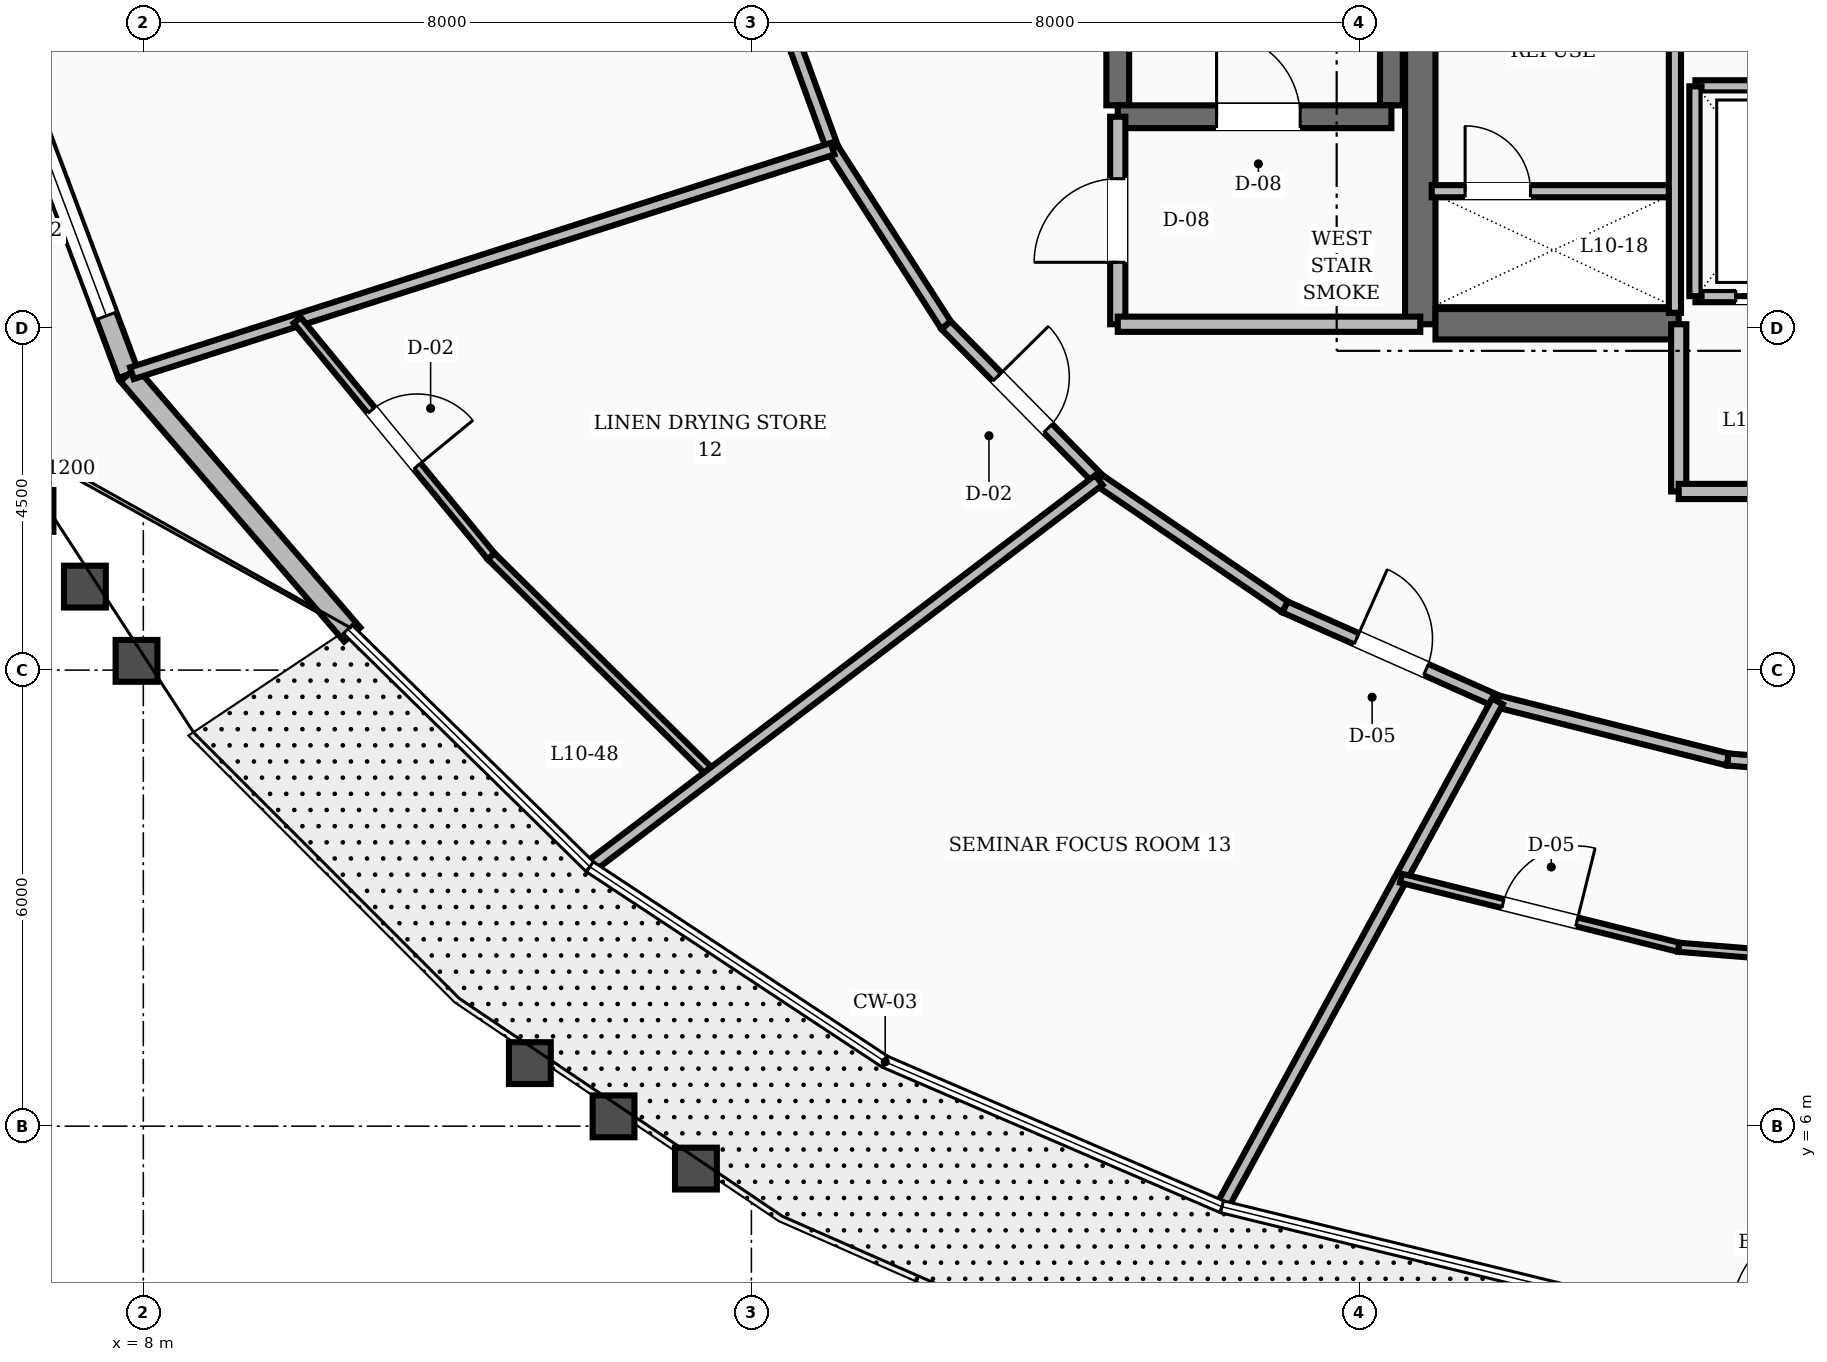
"""IFC4 building model, lengths in metres.
Left out: names, types, materials, properties, quantities, classifications, styles, units other than length and angle.
Written with IfcOpenShell. Run it as: python <this file> out.ifc"""

import sys

from ifc_helpers import new_model, si_unit, direction, frame, frame_2d, origin, place, context, subcontext, project, spatial, rectangle, extrude, element, fill, save


model = new_model("IFC4")
c1 = context("Model", 3, precision=1e-05, world=origin(), true_north=direction((0.0, 1.0)))
c2 = subcontext(c1, "Body", "Model", "MODEL_VIEW")
j1 = project(units=[si_unit("LENGTHUNIT", "METRE"), si_unit("PLANEANGLEUNIT", "RADIAN")], contexts=[c1])
p1 = place(None, origin())
s1 = spatial("IfcSite", under=j1, at=p1, CompositionType="ELEMENT")
p2 = place(p1, origin())
s2 = spatial("IfcBuilding", under=s1, at=p2, CompositionType="ELEMENT")
p3 = place(p2, frame((0.0, 0.0, 44.8)))
s3 = spatial("IfcBuildingStorey", under=s2, at=p3, CompositionType="ELEMENT", Elevation=44.8)
p4 = place(p3, frame((24.8, 16.55, 0.0), z_axis=(0.0, 0.0, 1.0), x_axis=(0.0, 1.0, 0.0)))
e1 = element("IfcWall", 1, at=p4, inside=s3, PredefinedType="SHEAR", context=c2, shape_type="SweptSolid", body=[
    extrude(rectangle(XDim=6.3, YDim=0.4, at=frame_2d((3.15, 0.0))), origin(), (0.0, 0.0, 1.0), 3.6),
])
p5 = place(p3, frame((25.0, 16.55, 0.0), z_axis=(0.0, 0.0, 1.0), x_axis=(1.0, 0.0, 0.0)))
e2 = element("IfcWall", 2, at=p5, inside=s3, PredefinedType="SHEAR", context=c2, shape_type="SweptSolid", body=[
    extrude(rectangle(XDim=3.2, YDim=0.4, at=frame_2d((1.6, 0.0))), origin(), (0.0, 0.0, 1.0), 3.6),
])
for number, where, z_axis, x_axis in (
    (3, (20.82, 19.43, 0.0), (0.0, 0.0, 1.0), (0.0, 1.0, 0.0)),
    (4, (24.42, 19.43, 0.0), (0.0, 0.0, 1.0), (0.0, 1.0, 0.0)),
):
    element("IfcWall", number, at=place(p3, frame(where, z_axis=z_axis, x_axis=x_axis)), inside=s3, PredefinedType="SHEAR", context=c2, shape_type="SweptSolid", body=[
        extrude(rectangle(XDim=8.74, YDim=0.3, at=frame_2d((4.37, 0.0))), origin(), (0.0, 0.0, 1.0), 3.6),
    ])
p6 = place(p3, frame((20.82, 19.28, 0.0), z_axis=(0.0, 0.0, 1.0), x_axis=(1.0, 0.0, 0.0)))
e5 = element("IfcWall", 5, at=p6, inside=s3, PredefinedType="SHEAR", context=c2, shape_type="SweptSolid", body=[
    extrude(rectangle(XDim=3.6, YDim=0.3, at=frame_2d((1.8, 0.0))), origin(), (0.0, 0.0, 1.0), 3.6),
])
p7 = place(p6, frame((1.3, 0.0, 0.0)))
e6 = element("IfcOpeningElement", 6, at=p7, cuts=e5, PredefinedType="OPENING", context=c2, shape_type="SweptSolid", body=[
    extrude(rectangle(XDim=1.1, YDim=2.1, at=frame_2d((0.55, 1.05))), frame((0.0, 0.16, 0.0), z_axis=(0.0, -1.0, 0.0), x_axis=(1.0, 0.0, 0.0)), (0.0, 0.0, 1.0), 0.32),
])
p8 = place(p3, frame((6.312, 19.866, 0.0), z_axis=(0.0, 0.0, 1.0), x_axis=(0.351066723894, -0.936350444745, 0.0)))
e7 = element("IfcWall", 7, at=p8, inside=s3, PredefinedType="STANDARD", context=c2, shape_type="SweptSolid", body=[
    extrude(rectangle(XDim=4.246, YDim=0.28, at=frame_2d((2.123, 0.0))), origin(), (0.0, 0.0, 1.0), 2.65),
])
p9 = place(p8, frame((0.823, 0.0, 0.8)))
e8 = element("IfcOpeningElement", 8, at=p9, cuts=e7, PredefinedType="OPENING", context=c2, shape_type="SweptSolid", body=[
    extrude(rectangle(XDim=2.6, YDim=1.65, at=frame_2d((1.3, 0.825))), frame((0.0, 0.15, 0.0), z_axis=(0.0, -1.0, 0.0), x_axis=(1.0, 0.0, 0.0)), (0.0, 0.0, 1.0), 0.3),
])
p10 = place(p3, frame((7.803, 15.891, 0.0), z_axis=(0.0, 0.0, 1.0), x_axis=(0.652392900896, -0.757880929211, 0.0)))
e9 = element("IfcWall", 9, at=p10, inside=s3, PredefinedType="STANDARD", context=c2, shape_type="SweptSolid", body=[
    extrude(rectangle(XDim=4.515, YDim=0.28, at=frame_2d((2.258, 0.0))), origin(), (0.0, 0.0, 1.0), 2.65),
])
p11 = place(p3, frame((20.82, 16.55, 0.0), z_axis=(0.0, 0.0, 1.0), x_axis=(0.0, 1.0, 0.0)))
e10 = element("IfcWall", 10, at=p11, inside=s3, PredefinedType="SOLIDWALL", context=c2, shape_type="SweptSolid", body=[
    extrude(rectangle(XDim=2.73, YDim=0.2, at=frame_2d((1.365, 0.0))), origin(), (0.0, 0.0, 1.0), 2.61),
])
p12 = place(p11, frame((0.815, 0.0, 0.0)))
e11 = element("IfcOpeningElement", 11, at=p12, cuts=e10, PredefinedType="OPENING", context=c2, shape_type="SweptSolid", body=[
    extrude(rectangle(XDim=1.1, YDim=2.1, at=frame_2d((0.55, 1.05))), frame((0.0, 0.11, 0.0), z_axis=(0.0, -1.0, 0.0), x_axis=(1.0, 0.0, 0.0)), (0.0, 0.0, 1.0), 0.22),
])
p13 = place(p3, frame((20.82, 16.55, 0.0), z_axis=(0.0, 0.0, 1.0), x_axis=(1.0, 0.0, 0.0)))
e12 = element("IfcWall", 12, at=p13, inside=s3, PredefinedType="SOLIDWALL", context=c2, shape_type="SweptSolid", body=[
    extrude(rectangle(XDim=3.98, YDim=0.2, at=frame_2d((1.99, 0.0))), origin(), (0.0, 0.0, 1.0), 2.61),
])
p14 = place(p3, frame((28.2, 14.35, 0.0), z_axis=(0.0, 0.0, 1.0), x_axis=(0.0, 1.0, 0.0)))
e13 = element("IfcWall", 13, at=p14, inside=s3, PredefinedType="SOLIDWALL", context=c2, shape_type="SweptSolid", body=[
    extrude(rectangle(XDim=2.2, YDim=0.2, at=frame_2d((1.1, 0.0))), origin(), (0.0, 0.0, 1.0), 2.61),
])
p15 = place(p3, frame((28.2, 14.35, 0.0), z_axis=(0.0, 0.0, 1.0), x_axis=(1.0, 0.0, 0.0)))
e14 = element("IfcWall", 14, at=p15, inside=s3, PredefinedType="SOLIDWALL", context=c2, shape_type="SweptSolid", body=[
    extrude(rectangle(XDim=7.6, YDim=0.2, at=frame_2d((3.8, 0.0))), origin(), (0.0, 0.0, 1.0), 2.61),
])
p16 = place(p15, frame((3.2, 0.0, 0.0)))
e15 = element("IfcOpeningElement", 15, at=p16, cuts=e14, PredefinedType="OPENING", context=c2, shape_type="SweptSolid", body=[
    extrude(rectangle(XDim=1.2, YDim=2.1, at=frame_2d((0.6, 1.05))), frame((0.0, 0.11, 0.0), z_axis=(0.0, -1.0, 0.0), x_axis=(1.0, 0.0, 0.0)), (0.0, 0.0, 1.0), 0.22),
])
p17 = place(p3, frame((28.42, 16.92, 0.0), z_axis=(0.0, 0.0, 1.0), x_axis=(1.0, 0.0, 0.0)))
e16 = element("IfcWall", 16, at=p17, inside=s3, PredefinedType="SOLIDWALL", context=c2, shape_type="SweptSolid", body=[
    extrude(rectangle(XDim=7.16, YDim=0.16, at=frame_2d((3.58, 0.0))), origin(), (0.0, 0.0, 1.0), 2.61),
])
p18 = place(p17, frame((0.53, 0.0, 0.0)))
e17 = element("IfcOpeningElement", 17, at=p18, cuts=e16, PredefinedType="OPENING", context=c2, shape_type="SweptSolid", body=[
    extrude(rectangle(XDim=1.1, YDim=2.15, at=frame_2d((0.55, 1.075))), frame((0.0, 0.09, 0.0), z_axis=(0.0, -1.0, 0.0), x_axis=(1.0, 0.0, 0.0)), (0.0, 0.0, 1.0), 0.18),
])
p19 = place(p17, frame((3.03, 0.0, 0.0)))
e18 = element("IfcOpeningElement", 18, at=p19, cuts=e16, PredefinedType="OPENING", context=c2, shape_type="SweptSolid", body=[
    extrude(rectangle(XDim=1.1, YDim=2.15, at=frame_2d((0.55, 1.075))), frame((0.0, 0.09, 0.0), z_axis=(0.0, -1.0, 0.0), x_axis=(1.0, 0.0, 0.0)), (0.0, 0.0, 1.0), 0.18),
])
p20 = place(p17, frame((5.53, 0.0, 0.0)))
e19 = element("IfcOpeningElement", 19, at=p20, cuts=e16, PredefinedType="OPENING", context=c2, shape_type="SweptSolid", body=[
    extrude(rectangle(XDim=1.1, YDim=2.15, at=frame_2d((0.55, 1.075))), frame((0.0, 0.09, 0.0), z_axis=(0.0, -1.0, 0.0), x_axis=(1.0, 0.0, 0.0)), (0.0, 0.0, 1.0), 0.18),
])
p21 = place(p3, frame((28.42, 19.68, 0.0), z_axis=(0.0, 0.0, 1.0), x_axis=(1.0, 0.0, 0.0)))
e20 = element("IfcWall", 20, at=p21, inside=s3, PredefinedType="SOLIDWALL", context=c2, shape_type="SweptSolid", body=[
    extrude(rectangle(XDim=7.16, YDim=0.16, at=frame_2d((3.58, 0.0))), origin(), (0.0, 0.0, 1.0), 2.61),
])
p22 = place(p3, frame((28.42, 16.92, 0.0), z_axis=(0.0, 0.0, 1.0), x_axis=(0.0, 1.0, 0.0)))
e21 = element("IfcWall", 21, at=p22, inside=s3, PredefinedType="SOLIDWALL", context=c2, shape_type="SweptSolid", body=[
    extrude(rectangle(XDim=2.76, YDim=0.16, at=frame_2d((1.38, 0.0))), origin(), (0.0, 0.0, 1.0), 2.61),
])
p23 = place(p3, frame((24.95, 18.3, 0.0), z_axis=(0.0, 0.0, 1.0), x_axis=(1.0, 0.0, 0.0)))
e22 = element("IfcWall", 22, at=p23, inside=s3, PredefinedType="SOLIDWALL", context=c2, shape_type="SweptSolid", body=[
    extrude(rectangle(XDim=3.2, YDim=0.16, at=frame_2d((1.6, 0.0))), origin(), (0.0, 0.0, 1.0), 2.61),
])
p24 = place(p23, frame((0.44, 0.0, 0.0)))
e23 = element("IfcOpeningElement", 23, at=p24, cuts=e22, PredefinedType="OPENING", context=c2, shape_type="SweptSolid", body=[
    extrude(rectangle(XDim=0.86, YDim=2.05, at=frame_2d((0.43, 1.025))), frame((0.0, 0.09, 0.0), z_axis=(0.0, -1.0, 0.0), x_axis=(1.0, 0.0, 0.0)), (0.0, 0.0, 1.0), 0.18),
])
p25 = place(p3, frame((28.15, 16.7, 0.0), z_axis=(0.0, 0.0, 1.0), x_axis=(0.0, 1.0, 0.0)))
e24 = element("IfcWall", 24, at=p25, inside=s3, PredefinedType="SOLIDWALL", context=c2, shape_type="SweptSolid", body=[
    extrude(rectangle(XDim=6.05, YDim=0.16, at=frame_2d((3.025, 0.0))), origin(), (0.0, 0.0, 1.0), 2.61),
])
p26 = place(p3, frame((16.148, 21.379, 0.0), z_axis=(0.0, 0.0, 1.0), x_axis=(0.342882618672, -0.939378257047, 0.0)))
e25 = element("IfcWall", 25, at=p26, inside=s3, PredefinedType="SOLIDWALL", context=c2, shape_type="SweptSolid", body=[
    extrude(rectangle(XDim=2.683, YDim=0.16, at=frame_2d((1.341, 0.0))), origin(), (0.0, 0.0, 1.0), 2.61),
])
p27 = place(p3, frame((17.068, 18.859, 0.0), z_axis=(0.0, 0.0, 1.0), x_axis=(0.540891657444, -0.841092274907, 0.0)))
e26 = element("IfcWall", 26, at=p27, inside=s3, PredefinedType="SOLIDWALL", context=c2, shape_type="SweptSolid", body=[
    extrude(rectangle(XDim=2.761, YDim=0.16, at=frame_2d((1.38, 0.0))), origin(), (0.0, 0.0, 1.0), 2.61),
])
p28 = place(p3, frame((18.562, 16.537, 0.0), z_axis=(0.0, 0.0, 1.0), x_axis=(0.702569520063, -0.711615113301, 0.0)))
e27 = element("IfcWall", 27, at=p28, inside=s3, PredefinedType="SOLIDWALL", context=c2, shape_type="SweptSolid", body=[
    extrude(rectangle(XDim=2.861, YDim=0.16, at=frame_2d((1.43, 0.0))), origin(), (0.0, 0.0, 1.0), 2.61),
])
p29 = place(p28, frame((0.955, 0.0, 0.0)))
e28 = element("IfcOpeningElement", 28, at=p29, cuts=e27, PredefinedType="OPENING", context=c2, shape_type="SweptSolid", body=[
    extrude(rectangle(XDim=0.95, YDim=2.1, at=frame_2d((0.475, 1.05))), frame((0.0, 0.09, 0.0), z_axis=(0.0, -1.0, 0.0), x_axis=(1.0, 0.0, 0.0)), (0.0, 0.0, 1.0), 0.18),
])
p30 = place(p3, frame((20.572, 14.501, 0.0), z_axis=(0.0, 0.0, 1.0), x_axis=(0.826112340767, -0.563505457323, 0.0)))
e29 = element("IfcWall", 29, at=p30, inside=s3, PredefinedType="SOLIDWALL", context=c2, shape_type="SweptSolid", body=[
    extrude(rectangle(XDim=2.965, YDim=0.16, at=frame_2d((1.482, 0.0))), origin(), (0.0, 0.0, 1.0), 2.61),
])
p31 = place(p3, frame((23.021, 12.83, 0.0), z_axis=(0.0, 0.0, 1.0), x_axis=(0.913860932409, -0.406027334321, 0.0)))
e30 = element("IfcWall", 30, at=p31, inside=s3, PredefinedType="SOLIDWALL", context=c2, shape_type="SweptSolid", body=[
    extrude(rectangle(XDim=3.058, YDim=0.16, at=frame_2d((1.529, 0.0))), origin(), (0.0, 0.0, 1.0), 2.61),
])
p32 = place(p31, frame((1.029, 0.0, 0.0)))
e31 = element("IfcOpeningElement", 31, at=p32, cuts=e30, PredefinedType="OPENING", context=c2, shape_type="SweptSolid", body=[
    extrude(rectangle(XDim=1.0, YDim=2.1, at=frame_2d((0.5, 1.05))), frame((0.0, 0.09, 0.0), z_axis=(0.0, -1.0, 0.0), x_axis=(1.0, 0.0, 0.0)), (0.0, 0.0, 1.0), 0.18),
])
p33 = place(p3, frame((25.815, 11.589, 0.0), z_axis=(0.0, 0.0, 1.0), x_axis=(0.969653665365, -0.244482656326, 0.0)))
e32 = element("IfcWall", 32, at=p33, inside=s3, PredefinedType="SOLIDWALL", context=c2, shape_type="SweptSolid", body=[
    extrude(rectangle(XDim=3.127, YDim=0.16, at=frame_2d((1.563, 0.0))), origin(), (0.0, 0.0, 1.0), 2.61),
])
p34 = place(p3, frame((28.847, 10.824, 0.0), z_axis=(0.0, 0.0, 1.0), x_axis=(0.996661331307, -0.081646743207, 0.0)))
e33 = element("IfcWall", 33, at=p34, inside=s3, PredefinedType="SOLIDWALL", context=c2, shape_type="SweptSolid", body=[
    extrude(rectangle(XDim=3.164, YDim=0.16, at=frame_2d((1.582, 0.0))), origin(), (0.0, 0.0, 1.0), 2.61),
])
p35 = place(p34, frame((1.082, 0.0, 0.0)))
e34 = element("IfcOpeningElement", 34, at=p35, cuts=e33, PredefinedType="OPENING", context=c2, shape_type="SweptSolid", body=[
    extrude(rectangle(XDim=1.0, YDim=2.1, at=frame_2d((0.5, 1.05))), frame((0.0, 0.09, 0.0), z_axis=(0.0, -1.0, 0.0), x_axis=(1.0, 0.0, 0.0)), (0.0, 0.0, 1.0), 0.18),
])
p36 = place(p3, frame((25.815, 11.589, 0.0), z_axis=(0.0, 0.0, 1.0), x_axis=(-0.478545125054, -0.87806296089, 0.0)))
e35 = element("IfcWall", 35, at=p36, inside=s3, PredefinedType="SOLIDWALL", context=c2, shape_type="SweptSolid", body=[
    extrude(rectangle(XDim=7.522, YDim=0.16, at=frame_2d((3.761, 0.0))), origin(), (0.0, 0.0, 1.0), 2.61),
])
p37 = place(p3, frame((24.547, 9.261, 0.0), z_axis=(0.0, 0.0, 1.0), x_axis=(0.97048105874, -0.241177350983, 0.0)))
e36 = element("IfcWall", 36, at=p37, inside=s3, PredefinedType="PARTITIONING", context=c2, shape_type="SweptSolid", body=[
    extrude(rectangle(XDim=3.765, YDim=0.12, at=frame_2d((1.882, 0.0))), origin(), (0.0, 0.0, 1.0), 2.61),
])
p38 = place(p37, frame((1.382, 0.0, 0.0)))
e37 = element("IfcOpeningElement", 37, at=p38, cuts=e36, PredefinedType="OPENING", context=c2, shape_type="SweptSolid", body=[
    extrude(rectangle(XDim=1.0, YDim=2.1, at=frame_2d((0.5, 1.05))), frame((0.0, 0.07, 0.0), z_axis=(0.0, -1.0, 0.0), x_axis=(1.0, 0.0, 0.0)), (0.0, 0.0, 1.0), 0.14),
])
p39 = place(p3, frame((28.2, 8.354, 0.0), z_axis=(0.0, 0.0, 1.0), x_axis=(0.996764368846, -0.080379058209, 0.0)))
e38 = element("IfcWall", 38, at=p39, inside=s3, PredefinedType="PARTITIONING", context=c2, shape_type="SweptSolid", body=[
    extrude(rectangle(XDim=3.812, YDim=0.12, at=frame_2d((1.906, 0.0))), origin(), (0.0, 0.0, 1.0), 2.61),
])
p40 = place(p3, frame((17.068, 18.859, 0.0), z_axis=(0.0, 0.0, 1.0), x_axis=(-0.952328332438, -0.30507498625, 0.0)))
e39 = element("IfcWall", 39, at=p40, inside=s3, PredefinedType="SOLIDWALL", context=c2, shape_type="SweptSolid", body=[
    extrude(rectangle(XDim=9.679, YDim=0.16, at=frame_2d((4.84, 0.0))), origin(), (0.0, 0.0, 1.0), 2.61),
])
p41 = place(p3, frame((10.025, 16.602, 0.0), z_axis=(0.0, 0.0, 1.0), x_axis=(0.634900022164, -0.772594306125, 0.0)))
e40 = element("IfcWall", 40, at=p41, inside=s3, PredefinedType="PARTITIONING", context=c2, shape_type="SweptSolid", body=[
    extrude(rectangle(XDim=4.02, YDim=0.12, at=frame_2d((2.01, 0.0))), origin(), (0.0, 0.0, 1.0), 2.61),
])
p42 = place(p41, frame((1.535, 0.0, 0.0)))
e41 = element("IfcOpeningElement", 41, at=p42, cuts=e40, PredefinedType="OPENING", context=c2, shape_type="SweptSolid", body=[
    extrude(rectangle(XDim=0.95, YDim=2.1, at=frame_2d((0.475, 1.05))), frame((0.0, 0.07, 0.0), z_axis=(0.0, -1.0, 0.0), x_axis=(1.0, 0.0, 0.0)), (0.0, 0.0, 1.0), 0.14),
])
p43 = place(p3, frame((12.577, 13.497, 0.0), z_axis=(0.0, 0.0, 1.0), x_axis=(0.712026279346, -0.702152816359, 0.0)))
e42 = element("IfcWall", 42, at=p43, inside=s3, PredefinedType="PARTITIONING", context=c2, shape_type="SweptSolid", body=[
    extrude(rectangle(XDim=4.08, YDim=0.12, at=frame_2d((2.04, 0.0))), origin(), (0.0, 0.0, 1.0), 2.61),
])
p44 = place(p3, frame((20.572, 14.501, 0.0), z_axis=(0.0, 0.0, 1.0), x_axis=(-0.796149813506, -0.605099557473, 0.0)))
e43 = element("IfcWall", 43, at=p44, inside=s3, PredefinedType="SOLIDWALL", context=c2, shape_type="SweptSolid", body=[
    extrude(rectangle(XDim=8.36, YDim=0.16, at=frame_2d((4.18, 0.0))), origin(), (0.0, 0.0, 1.0), 2.61),
])
p45 = place(p9, origin())
e44 = element("IfcWindow", 44, at=p45, inside=s3, PartitioningType="SINGLE_PANEL", PredefinedType="WINDOW", context=c2, shape_type="SweptSolid", body=[
    extrude(rectangle(XDim=2.6, YDim=1.65, at=frame_2d((1.3, 0.825))), frame((0.0, 0.03, 0.0), z_axis=(0.0, -1.0, 0.0), x_axis=(1.0, 0.0, 0.0)), (0.0, 0.0, 1.0), 0.06),
])
fill(e8, e44)
p46 = place(p7, origin())
e45 = element("IfcDoor", 45, at=p46, inside=s3, OperationType="SINGLE_SWING_LEFT", PredefinedType="DOOR", context=c2, shape_type="SweptSolid", body=[
    extrude(rectangle(XDim=1.1, YDim=2.1, at=frame_2d((0.55, 1.05))), frame((0.0, 0.025, 0.0), z_axis=(0.0, -1.0, 0.0), x_axis=(1.0, 0.0, 0.0)), (0.0, 0.0, 1.0), 0.05),
])
fill(e6, e45)
p47 = place(p12, origin())
e46 = element("IfcDoor", 46, at=p47, inside=s3, OperationType="SINGLE_SWING_LEFT", PredefinedType="DOOR", context=c2, shape_type="SweptSolid", body=[
    extrude(rectangle(XDim=1.1, YDim=2.1, at=frame_2d((0.55, 1.05))), frame((0.0, 0.025, 0.0), z_axis=(0.0, -1.0, 0.0), x_axis=(1.0, 0.0, 0.0)), (0.0, 0.0, 1.0), 0.05),
])
fill(e11, e46)
p48 = place(p18, origin())
e47 = element("IfcDoor", 47, at=p48, inside=s3, OperationType="SLIDING_TO_RIGHT", PredefinedType="DOOR", context=c2, shape_type="SweptSolid", body=[
    extrude(rectangle(XDim=1.1, YDim=2.15, at=frame_2d((0.55, 1.075))), frame((0.0, 0.025, 0.0), z_axis=(0.0, -1.0, 0.0), x_axis=(1.0, 0.0, 0.0)), (0.0, 0.0, 1.0), 0.05),
])
fill(e17, e47)
p49 = place(p24, origin())
e48 = element("IfcDoor", 48, at=p49, inside=s3, OperationType="SINGLE_SWING_LEFT", PredefinedType="TRAPDOOR", context=c2, shape_type="SweptSolid", body=[
    extrude(rectangle(XDim=0.86, YDim=2.05, at=frame_2d((0.43, 1.025))), frame((0.0, 0.025, 0.0), z_axis=(0.0, -1.0, 0.0), x_axis=(1.0, 0.0, 0.0)), (0.0, 0.0, 1.0), 0.05),
])
fill(e23, e48)
p50 = place(p38, origin())
e49 = element("IfcDoor", 49, at=p50, inside=s3, OperationType="SINGLE_SWING_RIGHT", PredefinedType="DOOR", context=c2, shape_type="SweptSolid", body=[
    extrude(rectangle(XDim=1.0, YDim=2.1, at=frame_2d((0.5, 1.05))), frame((0.0, 0.025, 0.0), z_axis=(0.0, -1.0, 0.0), x_axis=(1.0, 0.0, 0.0)), (0.0, 0.0, 1.0), 0.05),
])
fill(e37, e49)
p51 = place(p29, origin())
e50 = element("IfcDoor", 50, at=p51, inside=s3, OperationType="SINGLE_SWING_LEFT", PredefinedType="DOOR", context=c2, shape_type="SweptSolid", body=[
    extrude(rectangle(XDim=0.95, YDim=2.1, at=frame_2d((0.475, 1.05))), frame((0.0, 0.025, 0.0), z_axis=(0.0, -1.0, 0.0), x_axis=(1.0, 0.0, 0.0)), (0.0, 0.0, 1.0), 0.05),
])
fill(e28, e50)
p52 = place(p42, origin())
e51 = element("IfcDoor", 51, at=p52, inside=s3, OperationType="SINGLE_SWING_RIGHT", PredefinedType="DOOR", context=c2, shape_type="SweptSolid", body=[
    extrude(rectangle(XDim=0.95, YDim=2.1, at=frame_2d((0.475, 1.05))), frame((0.0, 0.025, 0.0), z_axis=(0.0, -1.0, 0.0), x_axis=(1.0, 0.0, 0.0)), (0.0, 0.0, 1.0), 0.05),
])
fill(e41, e51)
p53 = place(p32, origin())
e52 = element("IfcDoor", 52, at=p53, inside=s3, OperationType="SINGLE_SWING_LEFT", PredefinedType="DOOR", context=c2, shape_type="SweptSolid", body=[
    extrude(rectangle(XDim=1.0, YDim=2.1, at=frame_2d((0.5, 1.05))), frame((0.0, 0.025, 0.0), z_axis=(0.0, -1.0, 0.0), x_axis=(1.0, 0.0, 0.0)), (0.0, 0.0, 1.0), 0.05),
])
fill(e31, e52)
save(model, sys.argv[1])
